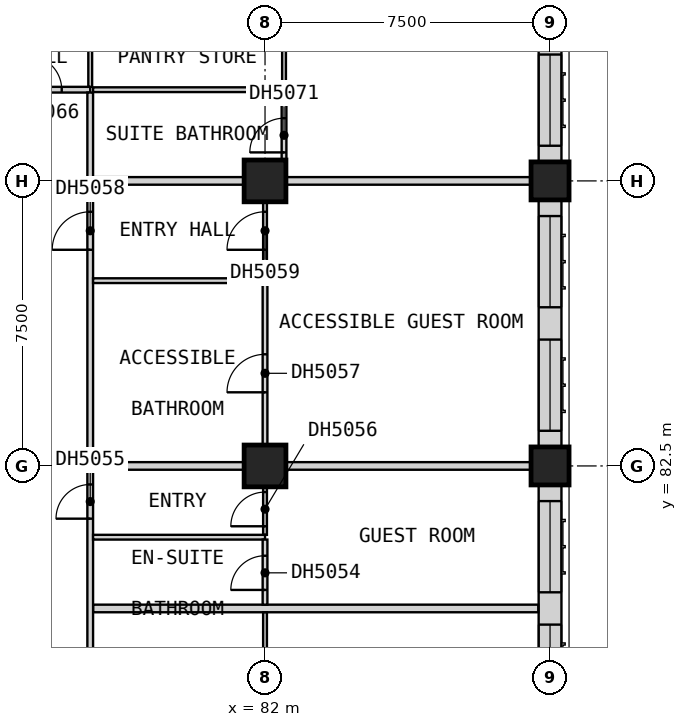
"""IFC4 building model, lengths in metres.
Left out: names, types, materials, properties, quantities, classifications, styles, units other than length and angle.
Written with IfcOpenShell. Run it as: python <this file> out.ifc"""

import sys

from ifc_helpers import new_model, si_unit, direction, frame, frame_2d, origin, origin_2d, place, context, subcontext, project, spatial, rectangle, extrude, element, fill, save


model = new_model("IFC4")
c1 = context("Model", 3, precision=1e-05, world=origin(), true_north=direction((0.0, 1.0)))
c2 = subcontext(c1, "Body", "Model", "MODEL_VIEW")
j1 = project(units=[si_unit("LENGTHUNIT", "METRE"), si_unit("PLANEANGLEUNIT", "RADIAN")], contexts=[c1])
p1 = place(None, origin())
s1 = spatial("IfcSite", under=j1, at=p1, CompositionType="ELEMENT")
p2 = place(p1, origin())
s2 = spatial("IfcBuilding", under=s1, at=p2, CompositionType="ELEMENT")
p3 = place(p2, frame((0.0, 0.0, 93.5)))
s3 = spatial("IfcBuildingStorey", under=s2, at=p3, CompositionType="ELEMENT", Elevation=93.5)
for number, where, z_axis, x_axis in (
    (1, (82.0, 82.5, 0.0), (0.0, 0.0, 1.0), (1.0, 0.0, 0.0)),
    (2, (82.0, 90.0, 0.0), (0.0, 0.0, 1.0), (1.0, 0.0, 0.0)),
):
    element("IfcColumn", number, at=place(p3, frame(where, z_axis=z_axis, x_axis=x_axis)), inside=s3, PredefinedType="COLUMN", context=c2, shape_type="SweptSolid", body=[
        extrude(rectangle(XDim=1.1, YDim=1.1, at=origin_2d()), origin(), (0.0, 0.0, 1.0), 3.6),
    ])
for number, where, z_axis, x_axis in (
    (3, (89.5, 82.5, 0.0), (0.0, 0.0, 1.0), (1.0, 0.0, 0.0)),
    (4, (89.5, 90.0, 0.0), (0.0, 0.0, 1.0), (1.0, 0.0, 0.0)),
):
    element("IfcColumn", number, at=place(p3, frame(where, z_axis=z_axis, x_axis=x_axis)), inside=s3, PredefinedType="COLUMN", context=c2, shape_type="SweptSolid", body=[
        extrude(rectangle(XDim=1.0, YDim=1.0, at=origin_2d()), origin(), (0.0, 0.0, 1.0), 3.6),
    ])
p4 = place(p3, frame((89.5, 75.5, 0.0), z_axis=(0.0, 0.0, 1.0), x_axis=(0.0, 1.0, 0.0)))
e5 = element("IfcWall", 5, at=p4, inside=s3, PredefinedType="SOLIDWALL", context=c2, shape_type="SweptSolid", body=[
    extrude(rectangle(XDim=6.5, YDim=0.6, at=frame_2d((3.25, 0.0))), origin(), (0.0, 0.0, 1.0), 2.85),
])
p5 = place(p4, frame((0.425, 0.0, 0.8)))
e6 = element("IfcOpeningElement", 6, at=p5, cuts=e5, PredefinedType="OPENING", context=c2, shape_type="SweptSolid", body=[
    extrude(rectangle(XDim=2.4, YDim=1.8, at=frame_2d((1.2, 0.9))), frame((0.0, 0.31, 0.0), z_axis=(0.0, -1.0, 0.0), x_axis=(1.0, 0.0, 0.0)), (0.0, 0.0, 1.0), 0.62),
])
p6 = place(p4, frame((3.675, 0.0, 0.8)))
e7 = element("IfcOpeningElement", 7, at=p6, cuts=e5, PredefinedType="OPENING", context=c2, shape_type="SweptSolid", body=[
    extrude(rectangle(XDim=2.4, YDim=1.8, at=frame_2d((1.2, 0.9))), frame((0.0, 0.31, 0.0), z_axis=(0.0, -1.0, 0.0), x_axis=(1.0, 0.0, 0.0)), (0.0, 0.0, 1.0), 0.62),
])
p7 = place(p3, frame((89.5, 83.0, 0.0), z_axis=(0.0, 0.0, 1.0), x_axis=(0.0, 1.0, 0.0)))
e8 = element("IfcWall", 8, at=p7, inside=s3, PredefinedType="SOLIDWALL", context=c2, shape_type="SweptSolid", body=[
    extrude(rectangle(XDim=6.5, YDim=0.6, at=frame_2d((3.25, 0.0))), origin(), (0.0, 0.0, 1.0), 2.85),
])
p8 = place(p7, frame((0.425, 0.0, 0.8)))
e9 = element("IfcOpeningElement", 9, at=p8, cuts=e8, PredefinedType="OPENING", context=c2, shape_type="SweptSolid", body=[
    extrude(rectangle(XDim=2.4, YDim=1.8, at=frame_2d((1.2, 0.9))), frame((0.0, 0.31, 0.0), z_axis=(0.0, -1.0, 0.0), x_axis=(1.0, 0.0, 0.0)), (0.0, 0.0, 1.0), 0.62),
])
p9 = place(p7, frame((3.675, 0.0, 0.8)))
e10 = element("IfcOpeningElement", 10, at=p9, cuts=e8, PredefinedType="OPENING", context=c2, shape_type="SweptSolid", body=[
    extrude(rectangle(XDim=2.4, YDim=1.8, at=frame_2d((1.2, 0.9))), frame((0.0, 0.31, 0.0), z_axis=(0.0, -1.0, 0.0), x_axis=(1.0, 0.0, 0.0)), (0.0, 0.0, 1.0), 0.62),
])
p10 = place(p3, frame((89.5, 90.5, 0.0), z_axis=(0.0, 0.0, 1.0), x_axis=(0.0, 1.0, 0.0)))
e11 = element("IfcWall", 11, at=p10, inside=s3, PredefinedType="SOLIDWALL", context=c2, shape_type="SweptSolid", body=[
    extrude(rectangle(XDim=6.0, YDim=0.6, at=frame_2d((3.0, 0.0))), origin(), (0.0, 0.0, 1.0), 2.85),
])
p11 = place(p10, frame((0.425, 0.0, 0.8)))
e12 = element("IfcOpeningElement", 12, at=p11, cuts=e11, PredefinedType="OPENING", context=c2, shape_type="SweptSolid", body=[
    extrude(rectangle(XDim=2.4, YDim=1.8, at=frame_2d((1.2, 0.9))), frame((0.0, 0.31, 0.0), z_axis=(0.0, -1.0, 0.0), x_axis=(1.0, 0.0, 0.0)), (0.0, 0.0, 1.0), 0.62),
])
p12 = place(p10, frame((3.425, 0.0, 0.8)))
e13 = element("IfcOpeningElement", 13, at=p12, cuts=e11, PredefinedType="OPENING", context=c2, shape_type="SweptSolid", body=[
    extrude(rectangle(XDim=2.4, YDim=1.8, at=frame_2d((1.2, 0.9))), frame((0.0, 0.31, 0.0), z_axis=(0.0, -1.0, 0.0), x_axis=(1.0, 0.0, 0.0)), (0.0, 0.0, 1.0), 0.62),
])
p13 = place(p3, frame((77.475, 78.75, 0.0), z_axis=(0.0, 0.0, 1.0), x_axis=(1.0, 0.0, 0.0)))
e14 = element("IfcWall", 14, at=p13, inside=s3, PredefinedType="PARTITIONING", context=c2, shape_type="SweptSolid", body=[
    extrude(rectangle(XDim=11.715, YDim=0.2, at=frame_2d((5.857, 0.0))), origin(), (0.0, 0.0, 1.0), 3.35),
])
for number, where, z_axis, x_axis in (
    (15, (77.475, 82.5, 0.0), (0.0, 0.0, 1.0), (1.0, 0.0, 0.0)),
    (16, (77.475, 90.0, 0.0), (0.0, 0.0, 1.0), (1.0, 0.0, 0.0)),
):
    element("IfcWall", number, at=place(p3, frame(where, z_axis=z_axis, x_axis=x_axis)), inside=s3, PredefinedType="PARTITIONING", context=c2, shape_type="SweptSolid", body=[
        extrude(rectangle(XDim=12.525, YDim=0.2, at=frame_2d((6.262, 0.0))), origin(), (0.0, 0.0, 1.0), 3.35),
    ])
p14 = place(p3, frame((33.75, 92.4, 0.0), z_axis=(0.0, 0.0, 1.0), x_axis=(1.0, 0.0, 0.0)))
e17 = element("IfcWall", 17, at=p14, inside=s3, PredefinedType="PARTITIONING", context=c2, shape_type="SweptSolid", body=[
    extrude(rectangle(XDim=43.65, YDim=0.15, at=frame_2d((21.825, 0.0))), origin(), (0.0, 0.0, 1.0), 3.35),
])
p15 = place(p14, frame((5.175, 0.0, 0.0)))
e18 = element("IfcOpeningElement", 18, at=p15, cuts=e17, PredefinedType="OPENING", context=c2, shape_type="SweptSolid", body=[
    extrude(rectangle(XDim=0.9, YDim=2.1, at=frame_2d((0.45, 1.05))), frame((0.0, 0.085, 0.0), z_axis=(0.0, -1.0, 0.0), x_axis=(1.0, 0.0, 0.0)), (0.0, 0.0, 1.0), 0.17),
])
p16 = place(p14, frame((13.05, 0.0, 0.0)))
e19 = element("IfcOpeningElement", 19, at=p16, cuts=e17, PredefinedType="OPENING", context=c2, shape_type="SweptSolid", body=[
    extrude(rectangle(XDim=0.9, YDim=2.1, at=frame_2d((0.45, 1.05))), frame((0.0, 0.085, 0.0), z_axis=(0.0, -1.0, 0.0), x_axis=(1.0, 0.0, 0.0)), (0.0, 0.0, 1.0), 0.17),
])
p17 = place(p14, frame((17.363, 0.0, 0.0)))
e20 = element("IfcOpeningElement", 20, at=p17, cuts=e17, PredefinedType="OPENING", context=c2, shape_type="SweptSolid", body=[
    extrude(rectangle(XDim=0.9, YDim=2.1, at=frame_2d((0.45, 1.05))), frame((0.0, 0.085, 0.0), z_axis=(0.0, -1.0, 0.0), x_axis=(1.0, 0.0, 0.0)), (0.0, 0.0, 1.0), 0.17),
])
p18 = place(p14, frame((24.3, 0.0, 0.0)))
e21 = element("IfcOpeningElement", 21, at=p18, cuts=e17, PredefinedType="OPENING", context=c2, shape_type="SweptSolid", body=[
    extrude(rectangle(XDim=0.9, YDim=2.1, at=frame_2d((0.45, 1.05))), frame((0.0, 0.085, 0.0), z_axis=(0.0, -1.0, 0.0), x_axis=(1.0, 0.0, 0.0)), (0.0, 0.0, 1.0), 0.17),
])
p19 = place(p14, frame((28.613, 0.0, 0.0)))
e22 = element("IfcOpeningElement", 22, at=p19, cuts=e17, PredefinedType="OPENING", context=c2, shape_type="SweptSolid", body=[
    extrude(rectangle(XDim=0.9, YDim=2.1, at=frame_2d((0.45, 1.05))), frame((0.0, 0.085, 0.0), z_axis=(0.0, -1.0, 0.0), x_axis=(1.0, 0.0, 0.0)), (0.0, 0.0, 1.0), 0.17),
])
p20 = place(p14, frame((32.363, 0.0, 0.0)))
e23 = element("IfcOpeningElement", 23, at=p20, cuts=e17, PredefinedType="OPENING", context=c2, shape_type="SweptSolid", body=[
    extrude(rectangle(XDim=0.9, YDim=2.1, at=frame_2d((0.45, 1.05))), frame((0.0, 0.085, 0.0), z_axis=(0.0, -1.0, 0.0), x_axis=(1.0, 0.0, 0.0)), (0.0, 0.0, 1.0), 0.17),
])
p21 = place(p14, frame((39.438, 0.0, 0.0)))
e24 = element("IfcOpeningElement", 24, at=p21, cuts=e17, PredefinedType="OPENING", context=c2, shape_type="SweptSolid", body=[
    extrude(rectangle(XDim=1.0, YDim=2.1, at=frame_2d((0.5, 1.05))), frame((0.0, 0.085, 0.0), z_axis=(0.0, -1.0, 0.0), x_axis=(1.0, 0.0, 0.0)), (0.0, 0.0, 1.0), 0.17),
])
p22 = place(p14, frame((42.0, 0.0, 0.0)))
e25 = element("IfcOpeningElement", 25, at=p22, cuts=e17, PredefinedType="OPENING", context=c2, shape_type="SweptSolid", body=[
    extrude(rectangle(XDim=0.9, YDim=2.1, at=frame_2d((0.45, 1.05))), frame((0.0, 0.085, 0.0), z_axis=(0.0, -1.0, 0.0), x_axis=(1.0, 0.0, 0.0)), (0.0, 0.0, 1.0), 0.17),
])
p23 = place(p3, frame((77.4, 50.175, 0.0), z_axis=(0.0, 0.0, 1.0), x_axis=(0.0, 1.0, 0.0)))
e26 = element("IfcWall", 26, at=p23, inside=s3, PredefinedType="PARTITIONING", context=c2, shape_type="SweptSolid", body=[
    extrude(rectangle(XDim=42.15, YDim=0.15, at=frame_2d((21.075, 0.0))), origin(), (0.0, 0.0, 1.0), 3.35),
])
p24 = place(p23, frame((4.125, 0.0, 0.0)))
e27 = element("IfcOpeningElement", 27, at=p24, cuts=e26, PredefinedType="OPENING", context=c2, shape_type="SweptSolid", body=[
    extrude(rectangle(XDim=0.9, YDim=2.1, at=frame_2d((0.45, 1.05))), frame((0.0, 0.085, 0.0), z_axis=(0.0, -1.0, 0.0), x_axis=(1.0, 0.0, 0.0)), (0.0, 0.0, 1.0), 0.17),
])
p25 = place(p23, frame((19.125, 0.0, 0.0)))
e28 = element("IfcOpeningElement", 28, at=p25, cuts=e26, PredefinedType="OPENING", context=c2, shape_type="SweptSolid", body=[
    extrude(rectangle(XDim=0.9, YDim=2.1, at=frame_2d((0.45, 1.05))), frame((0.0, 0.085, 0.0), z_axis=(0.0, -1.0, 0.0), x_axis=(1.0, 0.0, 0.0)), (0.0, 0.0, 1.0), 0.17),
])
p26 = place(p23, frame((26.625, 0.0, 0.0)))
e29 = element("IfcOpeningElement", 29, at=p26, cuts=e26, PredefinedType="OPENING", context=c2, shape_type="SweptSolid", body=[
    extrude(rectangle(XDim=0.9, YDim=2.1, at=frame_2d((0.45, 1.05))), frame((0.0, 0.085, 0.0), z_axis=(0.0, -1.0, 0.0), x_axis=(1.0, 0.0, 0.0)), (0.0, 0.0, 1.0), 0.17),
])
p27 = place(p23, frame((30.938, 0.0, 0.0)))
e30 = element("IfcOpeningElement", 30, at=p27, cuts=e26, PredefinedType="OPENING", context=c2, shape_type="SweptSolid", body=[
    extrude(rectangle(XDim=0.9, YDim=2.1, at=frame_2d((0.45, 1.05))), frame((0.0, 0.085, 0.0), z_axis=(0.0, -1.0, 0.0), x_axis=(1.0, 0.0, 0.0)), (0.0, 0.0, 1.0), 0.17),
])
p28 = place(p23, frame((38.012, 0.0, 0.0)))
e31 = element("IfcOpeningElement", 31, at=p28, cuts=e26, PredefinedType="OPENING", context=c2, shape_type="SweptSolid", body=[
    extrude(rectangle(XDim=1.0, YDim=2.1, at=frame_2d((0.5, 1.05))), frame((0.0, 0.085, 0.0), z_axis=(0.0, -1.0, 0.0), x_axis=(1.0, 0.0, 0.0)), (0.0, 0.0, 1.0), 0.17),
])
p29 = place(p3, frame((77.4, 92.475, 0.0), z_axis=(0.0, 0.0, 1.0), x_axis=(0.0, 1.0, 0.0)))
e32 = element("IfcWall", 32, at=p29, inside=s3, PredefinedType="PARTITIONING", context=c2, shape_type="SweptSolid", body=[
    extrude(rectangle(XDim=3.475, YDim=0.1, at=frame_2d((1.737, 0.0))), origin(), (0.0, 0.0, 1.0), 3.35),
])
p30 = place(p29, frame((1.275, 0.0, 0.0)))
e33 = element("IfcOpeningElement", 33, at=p30, cuts=e32, PredefinedType="OPENING", context=c2, shape_type="SweptSolid", body=[
    extrude(rectangle(XDim=0.9, YDim=2.1, at=frame_2d((0.45, 1.05))), frame((0.0, 0.06, 0.0), z_axis=(0.0, -1.0, 0.0), x_axis=(1.0, 0.0, 0.0)), (0.0, 0.0, 1.0), 0.12),
])
p31 = place(p3, frame((82.0, 75.812, 0.0), z_axis=(0.0, 0.0, 1.0), x_axis=(0.0, 1.0, 0.0)))
e34 = element("IfcWall", 34, at=p31, inside=s3, PredefinedType="PARTITIONING", context=c2, shape_type="SweptSolid", body=[
    extrude(rectangle(XDim=2.837, YDim=0.1, at=frame_2d((1.419, 0.0))), origin(), (0.0, 0.0, 1.0), 3.35),
])
p32 = place(p31, frame((0.988, 0.0, 0.0)))
e35 = element("IfcOpeningElement", 35, at=p32, cuts=e34, PredefinedType="OPENING", context=c2, shape_type="SweptSolid", body=[
    extrude(rectangle(XDim=0.9, YDim=2.1, at=frame_2d((0.45, 1.05))), frame((0.0, 0.06, 0.0), z_axis=(0.0, -1.0, 0.0), x_axis=(1.0, 0.0, 0.0)), (0.0, 0.0, 1.0), 0.12),
])
p33 = place(p3, frame((82.0, 80.688, 0.0), z_axis=(0.0, 0.0, 1.0), x_axis=(0.0, 1.0, 0.0)))
e36 = element("IfcWall", 36, at=p33, inside=s3, PredefinedType="PARTITIONING", context=c2, shape_type="SweptSolid", body=[
    extrude(rectangle(XDim=1.712, YDim=0.1, at=frame_2d((0.856, 0.0))), origin(), (0.0, 0.0, 1.0), 3.35),
])
p34 = place(p33, frame((0.225, 0.0, 0.0)))
e37 = element("IfcOpeningElement", 37, at=p34, cuts=e36, PredefinedType="OPENING", context=c2, shape_type="SweptSolid", body=[
    extrude(rectangle(XDim=0.9, YDim=2.1, at=frame_2d((0.45, 1.05))), frame((0.0, 0.06, 0.0), z_axis=(0.0, -1.0, 0.0), x_axis=(1.0, 0.0, 0.0)), (0.0, 0.0, 1.0), 0.12),
])
p35 = place(p3, frame((82.0, 87.438, 0.0), z_axis=(0.0, 0.0, 1.0), x_axis=(0.0, 1.0, 0.0)))
e38 = element("IfcWall", 38, at=p35, inside=s3, PredefinedType="PARTITIONING", context=c2, shape_type="SweptSolid", body=[
    extrude(rectangle(XDim=2.462, YDim=0.1, at=frame_2d((1.231, 0.0))), origin(), (0.0, 0.0, 1.0), 3.35),
])
p36 = place(p35, frame((0.75, 0.0, 0.0)))
e39 = element("IfcOpeningElement", 39, at=p36, cuts=e38, PredefinedType="OPENING", context=c2, shape_type="SweptSolid", body=[
    extrude(rectangle(XDim=1.0, YDim=2.1, at=frame_2d((0.5, 1.05))), frame((0.0, 0.06, 0.0), z_axis=(0.0, -1.0, 0.0), x_axis=(1.0, 0.0, 0.0)), (0.0, 0.0, 1.0), 0.12),
])
p37 = place(p3, frame((82.5, 92.462, 0.0), z_axis=(0.0, 0.0, 1.0), x_axis=(0.0, 1.0, 0.0)))
e40 = element("IfcWall", 40, at=p37, inside=s3, PredefinedType="PARTITIONING", context=c2, shape_type="SweptSolid", body=[
    extrude(rectangle(XDim=11.728, YDim=0.1, at=frame_2d((5.864, 0.0))), origin(), (0.0, 0.0, 1.0), 3.35),
])
p38 = place(p37, frame((10.212, 0.0, 0.0)))
e41 = element("IfcOpeningElement", 41, at=p38, cuts=e40, PredefinedType="OPENING", context=c2, shape_type="SweptSolid", body=[
    extrude(rectangle(XDim=0.9, YDim=2.1, at=frame_2d((0.45, 1.05))), frame((0.0, 0.06, 0.0), z_axis=(0.0, -1.0, 0.0), x_axis=(1.0, 0.0, 0.0)), (0.0, 0.0, 1.0), 0.12),
])
p39 = place(p37, frame((1.288, 0.0, 0.0)))
e42 = element("IfcOpeningElement", 42, at=p39, cuts=e40, PredefinedType="OPENING", context=c2, shape_type="SweptSolid", body=[
    extrude(rectangle(XDim=0.9, YDim=2.1, at=frame_2d((0.45, 1.05))), frame((0.0, 0.06, 0.0), z_axis=(0.0, -1.0, 0.0), x_axis=(1.0, 0.0, 0.0)), (0.0, 0.0, 1.0), 0.12),
])
for number, where, z_axis, x_axis in (
    (43, (77.475, 80.625, 0.0), (0.0, 0.0, 1.0), (1.0, 0.0, 0.0)),
    (44, (77.475, 87.375, 0.0), (0.0, 0.0, 1.0), (1.0, 0.0, 0.0)),
):
    element("IfcWall", number, at=place(p3, frame(where, z_axis=z_axis, x_axis=x_axis)), inside=s3, PredefinedType="PARTITIONING", context=c2, shape_type="SweptSolid", body=[
        extrude(rectangle(XDim=4.525, YDim=0.125, at=frame_2d((2.262, 0.0))), origin(), (0.0, 0.0, 1.0), 3.35),
    ])
p40 = place(p3, frame((77.475, 92.4, 0.0), z_axis=(0.0, 0.0, 1.0), x_axis=(1.0, 0.0, 0.0)))
e45 = element("IfcWall", 45, at=p40, inside=s3, PredefinedType="PARTITIONING", context=c2, shape_type="SweptSolid", body=[
    extrude(rectangle(XDim=5.025, YDim=0.125, at=frame_2d((2.512, 0.0))), origin(), (0.0, 0.0, 1.0), 3.35),
])
p41 = place(p3, frame((82.0, 78.85, 0.0), z_axis=(0.0, 0.0, 1.0), x_axis=(0.0, 1.0, 0.0)))
e46 = element("IfcWall", 46, at=p41, inside=s3, PredefinedType="PARTITIONING", context=c2, shape_type="SweptSolid", body=[
    extrude(rectangle(XDim=1.712, YDim=0.125, at=frame_2d((0.856, 0.0))), origin(), (0.0, 0.0, 1.0), 3.35),
])
p42 = place(p41, frame((0.387, 0.0, 0.0)))
e47 = element("IfcOpeningElement", 47, at=p42, cuts=e46, PredefinedType="OPENING", context=c2, shape_type="SweptSolid", body=[
    extrude(rectangle(XDim=0.9, YDim=2.1, at=frame_2d((0.45, 1.05))), frame((0.0, 0.073, 0.0), z_axis=(0.0, -1.0, 0.0), x_axis=(1.0, 0.0, 0.0)), (0.0, 0.0, 1.0), 0.145),
])
p43 = place(p3, frame((82.0, 82.6, 0.0), z_axis=(0.0, 0.0, 1.0), x_axis=(0.0, 1.0, 0.0)))
e48 = element("IfcWall", 48, at=p43, inside=s3, PredefinedType="PARTITIONING", context=c2, shape_type="SweptSolid", body=[
    extrude(rectangle(XDim=4.712, YDim=0.125, at=frame_2d((2.356, 0.0))), origin(), (0.0, 0.0, 1.0), 3.35),
])
p44 = place(p43, frame((1.837, 0.0, 0.0)))
e49 = element("IfcOpeningElement", 49, at=p44, cuts=e48, PredefinedType="OPENING", context=c2, shape_type="SweptSolid", body=[
    extrude(rectangle(XDim=1.0, YDim=2.1, at=frame_2d((0.5, 1.05))), frame((0.0, 0.073, 0.0), z_axis=(0.0, -1.0, 0.0), x_axis=(1.0, 0.0, 0.0)), (0.0, 0.0, 1.0), 0.145),
])
p45 = place(p3, frame((82.5, 90.1, 0.0), z_axis=(0.0, 0.0, 1.0), x_axis=(0.0, 1.0, 0.0)))
e50 = element("IfcWall", 50, at=p45, inside=s3, PredefinedType="PARTITIONING", context=c2, shape_type="SweptSolid", body=[
    extrude(rectangle(XDim=2.237, YDim=0.125, at=frame_2d((1.119, 0.0))), origin(), (0.0, 0.0, 1.0), 3.35),
])
p46 = place(p45, frame((0.65, 0.0, 0.0)))
e51 = element("IfcOpeningElement", 51, at=p46, cuts=e50, PredefinedType="OPENING", context=c2, shape_type="SweptSolid", body=[
    extrude(rectangle(XDim=0.9, YDim=2.1, at=frame_2d((0.45, 1.05))), frame((0.0, 0.073, 0.0), z_axis=(0.0, -1.0, 0.0), x_axis=(1.0, 0.0, 0.0)), (0.0, 0.0, 1.0), 0.145),
])
p47 = place(p5, origin())
e52 = element("IfcWindow", 52, at=p47, inside=s3, PartitioningType="SINGLE_PANEL", PredefinedType="WINDOW", context=c2, shape_type="SweptSolid", body=[
    extrude(rectangle(XDim=2.4, YDim=1.8, at=frame_2d((1.2, 0.9))), frame((0.0, -0.07, 0.0), z_axis=(0.0, -1.0, 0.0), x_axis=(1.0, 0.0, 0.0)), (0.0, 0.0, 1.0), 0.06),
])
fill(e6, e52)
p48 = place(p6, origin())
e53 = element("IfcWindow", 53, at=p48, inside=s3, PartitioningType="SINGLE_PANEL", PredefinedType="WINDOW", context=c2, shape_type="SweptSolid", body=[
    extrude(rectangle(XDim=2.4, YDim=1.8, at=frame_2d((1.2, 0.9))), frame((0.0, -0.07, 0.0), z_axis=(0.0, -1.0, 0.0), x_axis=(1.0, 0.0, 0.0)), (0.0, 0.0, 1.0), 0.06),
])
fill(e7, e53)
p49 = place(p8, origin())
e54 = element("IfcWindow", 54, at=p49, inside=s3, PartitioningType="SINGLE_PANEL", PredefinedType="WINDOW", context=c2, shape_type="SweptSolid", body=[
    extrude(rectangle(XDim=2.4, YDim=1.8, at=frame_2d((1.2, 0.9))), frame((0.0, -0.07, 0.0), z_axis=(0.0, -1.0, 0.0), x_axis=(1.0, 0.0, 0.0)), (0.0, 0.0, 1.0), 0.06),
])
fill(e9, e54)
p50 = place(p9, origin())
e55 = element("IfcWindow", 55, at=p50, inside=s3, PartitioningType="SINGLE_PANEL", PredefinedType="WINDOW", context=c2, shape_type="SweptSolid", body=[
    extrude(rectangle(XDim=2.4, YDim=1.8, at=frame_2d((1.2, 0.9))), frame((0.0, -0.07, 0.0), z_axis=(0.0, -1.0, 0.0), x_axis=(1.0, 0.0, 0.0)), (0.0, 0.0, 1.0), 0.06),
])
fill(e10, e55)
p51 = place(p11, origin())
e56 = element("IfcWindow", 56, at=p51, inside=s3, PartitioningType="SINGLE_PANEL", PredefinedType="WINDOW", context=c2, shape_type="SweptSolid", body=[
    extrude(rectangle(XDim=2.4, YDim=1.8, at=frame_2d((1.2, 0.9))), frame((0.0, -0.07, 0.0), z_axis=(0.0, -1.0, 0.0), x_axis=(1.0, 0.0, 0.0)), (0.0, 0.0, 1.0), 0.06),
])
fill(e12, e56)
p52 = place(p42, origin())
e57 = element("IfcDoor", 57, at=p52, inside=s3, OperationType="SINGLE_SWING_LEFT", PredefinedType="DOOR", context=c2, shape_type="SweptSolid", body=[
    extrude(rectangle(XDim=0.9, YDim=2.1, at=frame_2d((0.45, 1.05))), frame((0.0, 0.025, 0.0), z_axis=(0.0, -1.0, 0.0), x_axis=(1.0, 0.0, 0.0)), (0.0, 0.0, 1.0), 0.05),
])
fill(e47, e57)
p53 = place(p27, origin())
e58 = element("IfcDoor", 58, at=p53, inside=s3, OperationType="SINGLE_SWING_RIGHT", PredefinedType="DOOR", context=c2, shape_type="SweptSolid", body=[
    extrude(rectangle(XDim=0.9, YDim=2.1, at=frame_2d((0.45, 1.05))), frame((0.0, 0.025, 0.0), z_axis=(0.0, -1.0, 0.0), x_axis=(1.0, 0.0, 0.0)), (0.0, 0.0, 1.0), 0.05),
])
fill(e30, e58)
p54 = place(p34, origin())
e59 = element("IfcDoor", 59, at=p54, inside=s3, OperationType="SINGLE_SWING_LEFT", PredefinedType="DOOR", context=c2, shape_type="SweptSolid", body=[
    extrude(rectangle(XDim=0.9, YDim=2.1, at=frame_2d((0.45, 1.05))), frame((0.0, 0.025, 0.0), z_axis=(0.0, -1.0, 0.0), x_axis=(1.0, 0.0, 0.0)), (0.0, 0.0, 1.0), 0.05),
])
fill(e37, e59)
p55 = place(p44, origin())
e60 = element("IfcDoor", 60, at=p55, inside=s3, OperationType="SINGLE_SWING_LEFT", PredefinedType="DOOR", context=c2, shape_type="SweptSolid", body=[
    extrude(rectangle(XDim=1.0, YDim=2.1, at=frame_2d((0.5, 1.05))), frame((0.0, 0.025, 0.0), z_axis=(0.0, -1.0, 0.0), x_axis=(1.0, 0.0, 0.0)), (0.0, 0.0, 1.0), 0.05),
])
fill(e49, e60)
p56 = place(p28, origin())
e61 = element("IfcDoor", 61, at=p56, inside=s3, OperationType="SINGLE_SWING_RIGHT", PredefinedType="DOOR", context=c2, shape_type="SweptSolid", body=[
    extrude(rectangle(XDim=1.0, YDim=2.1, at=frame_2d((0.5, 1.05))), frame((0.0, 0.025, 0.0), z_axis=(0.0, -1.0, 0.0), x_axis=(1.0, 0.0, 0.0)), (0.0, 0.0, 1.0), 0.05),
])
fill(e31, e61)
p57 = place(p36, origin())
e62 = element("IfcDoor", 62, at=p57, inside=s3, OperationType="SINGLE_SWING_LEFT", PredefinedType="DOOR", context=c2, shape_type="SweptSolid", body=[
    extrude(rectangle(XDim=1.0, YDim=2.1, at=frame_2d((0.5, 1.05))), frame((0.0, 0.025, 0.0), z_axis=(0.0, -1.0, 0.0), x_axis=(1.0, 0.0, 0.0)), (0.0, 0.0, 1.0), 0.05),
])
fill(e39, e62)
p58 = place(p22, origin())
e63 = element("IfcDoor", 63, at=p58, inside=s3, OperationType="SINGLE_SWING_RIGHT", PredefinedType="DOOR", context=c2, shape_type="SweptSolid", body=[
    extrude(rectangle(XDim=0.9, YDim=2.1, at=frame_2d((0.45, 1.05))), frame((0.0, 0.025, 0.0), z_axis=(0.0, -1.0, 0.0), x_axis=(1.0, 0.0, 0.0)), (0.0, 0.0, 1.0), 0.05),
])
fill(e25, e63)
p59 = place(p46, origin())
e64 = element("IfcDoor", 64, at=p59, inside=s3, OperationType="SINGLE_SWING_LEFT", PredefinedType="DOOR", context=c2, shape_type="SweptSolid", body=[
    extrude(rectangle(XDim=0.9, YDim=2.1, at=frame_2d((0.45, 1.05))), frame((0.0, 0.025, 0.0), z_axis=(0.0, -1.0, 0.0), x_axis=(1.0, 0.0, 0.0)), (0.0, 0.0, 1.0), 0.05),
])
fill(e51, e64)
save(model, sys.argv[1])
